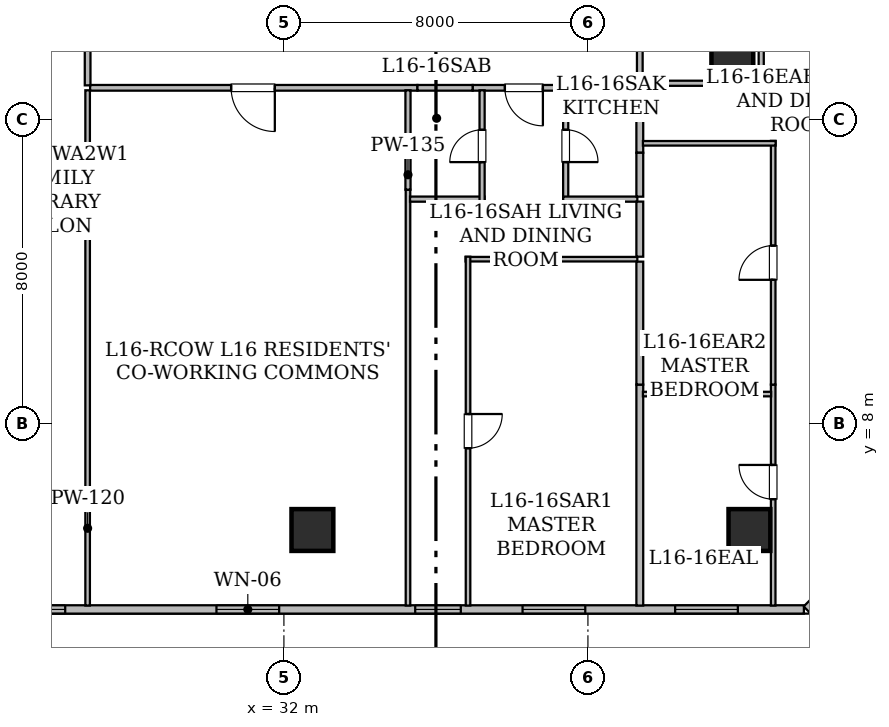
"""IFC4 building model, lengths in metres.
Left out: names, types, materials, properties, quantities, classifications, styles, units other than length and angle.
Written with IfcOpenShell. Run it as: python <this file> out.ifc"""

import sys

from ifc_helpers import new_model, si_unit, direction, frame, frame_2d, origin, origin_2d, place, context, subcontext, project, spatial, rectangle, hollow_rectangle, extrude, element, fill, save


model = new_model("IFC4")
c1 = context("Model", 3, precision=1e-05, world=origin(), true_north=direction((0.0, 1.0)))
c2 = subcontext(c1, "Body", "Model", "MODEL_VIEW")
j1 = project(units=[si_unit("LENGTHUNIT", "METRE"), si_unit("PLANEANGLEUNIT", "RADIAN")], contexts=[c1])
p1 = place(None, origin())
s1 = spatial("IfcSite", under=j1, at=p1, CompositionType="ELEMENT")
p2 = place(p1, origin())
s2 = spatial("IfcBuilding", under=s1, at=p2, CompositionType="ELEMENT")
p3 = place(p2, frame((0.0, 0.0, 66.15)))
s3 = spatial("IfcBuildingStorey", under=s2, at=p3, CompositionType="ELEMENT", Elevation=66.15)
for number, where, z_axis, x_axis in (
    (1, (32.75, 5.2, 0.0), (0.0, 0.0, 1.0), (1.0, 0.0, 0.0)),
    (2, (44.25, 5.2, 0.0), (0.0, 0.0, 1.0), (1.0, 0.0, 0.0)),
    (3, (43.8, 17.8, 0.0), (0.0, 0.0, 1.0), (1.0, 0.0, 0.0)),
):
    element("IfcColumn", number, at=place(p3, frame(where, z_axis=z_axis, x_axis=x_axis)), inside=s3, PredefinedType="COLUMN", context=c2, shape_type="SweptSolid", body=[
        extrude(hollow_rectangle(XDim=1.1, YDim=1.1, WallThickness=0.055, at=origin_2d()), origin(), (0.0, 0.0, 1.0), 3.65),
    ])
p4 = place(p3, frame((49.84, 7.196, 0.0), z_axis=(0.0, 0.0, 1.0), x_axis=(-0.707127905562, -0.70708565618, 0.0)))
e4 = element("IfcWall", 4, at=p4, inside=s3, PredefinedType="STANDARD", context=c2, shape_type="SweptSolid", body=[
    extrude(rectangle(XDim=5.779, YDim=0.22, at=frame_2d((2.889, 0.0))), origin(), (0.0, 0.0, 1.0), 3.43),
])
p5 = place(p3, frame((45.683, 3.11, 0.0), z_axis=(0.0, 0.0, 1.0), x_axis=(-1.0, 0.0, 0.0)))
e5 = element("IfcWall", 5, at=p5, inside=s3, PredefinedType="STANDARD", context=c2, shape_type="SweptSolid", body=[
    extrude(rectangle(XDim=37.368, YDim=0.22, at=frame_2d((18.684, 0.0))), origin(), (0.0, 0.0, 1.0), 3.43),
])
p6 = place(p5, frame((13.808, 0.0, 0.85)))
e6 = element("IfcOpeningElement", 6, at=p6, cuts=e5, PredefinedType="OPENING", context=c2, shape_type="SweptSolid", body=[
    extrude(rectangle(XDim=1.65, YDim=1.55, at=frame_2d((0.825, 0.775))), frame((0.0, 0.12, 0.0), z_axis=(0.0, -1.0, 0.0), x_axis=(1.0, 0.0, 0.0)), (0.0, 0.0, 1.0), 0.24),
])
p7 = place(p5, frame((32.554, 0.0, 0.85)))
e7 = element("IfcOpeningElement", 7, at=p7, cuts=e5, PredefinedType="OPENING", context=c2, shape_type="SweptSolid", body=[
    extrude(rectangle(XDim=1.65, YDim=1.55, at=frame_2d((0.825, 0.775))), frame((0.0, 0.12, 0.0), z_axis=(0.0, -1.0, 0.0), x_axis=(1.0, 0.0, 0.0)), (0.0, 0.0, 1.0), 0.24),
])
p8 = place(p5, frame((19.438, 0.0, 0.85)))
e8 = element("IfcOpeningElement", 8, at=p8, cuts=e5, PredefinedType="OPENING", context=c2, shape_type="SweptSolid", body=[
    extrude(rectangle(XDim=1.65, YDim=1.55, at=frame_2d((0.825, 0.775))), frame((0.0, 0.12, 0.0), z_axis=(0.0, -1.0, 0.0), x_axis=(1.0, 0.0, 0.0)), (0.0, 0.0, 1.0), 0.24),
])
p9 = place(p5, frame((21.869, 0.0, 0.8)))
e9 = element("IfcOpeningElement", 9, at=p9, cuts=e5, PredefinedType="OPENING", context=c2, shape_type="SweptSolid", body=[
    extrude(rectangle(XDim=1.2, YDim=1.5, at=frame_2d((0.6, 0.75))), frame((0.0, 0.12, 0.0), z_axis=(0.0, -1.0, 0.0), x_axis=(1.0, 0.0, 0.0)), (0.0, 0.0, 1.0), 0.24),
])
p10 = place(p5, frame((28.512, 0.0, 0.85)))
e10 = element("IfcOpeningElement", 10, at=p10, cuts=e5, PredefinedType="OPENING", context=c2, shape_type="SweptSolid", body=[
    extrude(rectangle(XDim=1.65, YDim=1.55, at=frame_2d((0.825, 0.775))), frame((0.0, 0.12, 0.0), z_axis=(0.0, -1.0, 0.0), x_axis=(1.0, 0.0, 0.0)), (0.0, 0.0, 1.0), 0.24),
])
p11 = place(p5, frame((24.567, 0.0, 0.85)))
e11 = element("IfcOpeningElement", 11, at=p11, cuts=e5, PredefinedType="OPENING", context=c2, shape_type="SweptSolid", body=[
    extrude(rectangle(XDim=1.65, YDim=1.55, at=frame_2d((0.825, 0.775))), frame((0.0, 0.12, 0.0), z_axis=(0.0, -1.0, 0.0), x_axis=(1.0, 0.0, 0.0)), (0.0, 0.0, 1.0), 0.24),
])
p12 = place(p5, frame((9.028, 0.0, 0.8)))
e12 = element("IfcOpeningElement", 12, at=p12, cuts=e5, PredefinedType="OPENING", context=c2, shape_type="SweptSolid", body=[
    extrude(rectangle(XDim=1.2, YDim=1.5, at=frame_2d((0.6, 0.75))), frame((0.0, 0.12, 0.0), z_axis=(0.0, -1.0, 0.0), x_axis=(1.0, 0.0, 0.0)), (0.0, 0.0, 1.0), 0.24),
])
p13 = place(p5, frame((5.753, 0.0, 0.85)))
e13 = element("IfcOpeningElement", 13, at=p13, cuts=e5, PredefinedType="OPENING", context=c2, shape_type="SweptSolid", body=[
    extrude(rectangle(XDim=1.65, YDim=1.55, at=frame_2d((0.825, 0.775))), frame((0.0, 0.12, 0.0), z_axis=(0.0, -1.0, 0.0), x_axis=(1.0, 0.0, 0.0)), (0.0, 0.0, 1.0), 0.24),
])
p14 = place(p5, frame((1.738, 0.0, 0.85)))
e14 = element("IfcOpeningElement", 14, at=p14, cuts=e5, PredefinedType="OPENING", context=c2, shape_type="SweptSolid", body=[
    extrude(rectangle(XDim=1.65, YDim=1.55, at=frame_2d((0.825, 0.775))), frame((0.0, 0.12, 0.0), z_axis=(0.0, -1.0, 0.0), x_axis=(1.0, 0.0, 0.0)), (0.0, 0.0, 1.0), 0.24),
])
p15 = place(p3, frame((35.514, 16.835, 0.0), z_axis=(0.0, 0.0, 1.0), x_axis=(-1.0, 0.0, 0.0)))
e15 = element("IfcWall", 15, at=p15, inside=s3, PredefinedType="STANDARD", context=c2, shape_type="SweptSolid", body=[
    extrude(rectangle(XDim=8.614, YDim=0.15, at=frame_2d((4.307, 0.0))), origin(), (0.0, 0.0, 1.0), 2.647),
])
p16 = place(p15, frame((3.753, 0.0, 0.0)))
e16 = element("IfcOpeningElement", 16, at=p16, cuts=e15, PredefinedType="OPENING", context=c2, shape_type="SweptSolid", body=[
    extrude(rectangle(XDim=1.15, YDim=2.2, at=frame_2d((0.575, 1.1))), frame((0.0, 0.085, 0.0), z_axis=(0.0, -1.0, 0.0), x_axis=(1.0, 0.0, 0.0)), (0.0, 0.0, 1.0), 0.17),
])
p17 = place(p3, frame((26.835, 16.9, 0.0), z_axis=(0.0, 0.0, 1.0), x_axis=(0.0, 1.0, 0.0)))
e17 = element("IfcWall", 17, at=p17, inside=s3, PredefinedType="STANDARD", context=c2, shape_type="SweptSolid", body=[
    extrude(rectangle(XDim=2.068, YDim=0.15, at=frame_2d((1.034, 0.0))), origin(), (0.0, 0.0, 1.0), 2.647),
])
p18 = place(p3, frame((39.664, 16.835, 0.0), z_axis=(0.0, 0.0, 1.0), x_axis=(-1.0, 0.0, 0.0)))
e18 = element("IfcWall", 18, at=p18, inside=s3, PredefinedType="STANDARD", context=c2, shape_type="SweptSolid", body=[
    extrude(rectangle(XDim=2.698, YDim=0.15, at=frame_2d((1.349, 0.0))), origin(), (0.0, 0.0, 1.0), 3.43),
])
p19 = place(p18, frame((0.849, 0.0, 0.0)))
e19 = element("IfcOpeningElement", 19, at=p19, cuts=e18, PredefinedType="OPENING", context=c2, shape_type="SweptSolid", body=[
    extrude(rectangle(XDim=1.0, YDim=2.15, at=frame_2d((0.5, 1.075))), frame((0.0, 0.085, 0.0), z_axis=(0.0, -1.0, 0.0), x_axis=(1.0, 0.0, 0.0)), (0.0, 0.0, 1.0), 0.17),
])
p20 = place(p3, frame((36.966, 16.835, 0.0), z_axis=(0.0, 0.0, 1.0), x_axis=(-1.0, 0.0, 0.0)))
e20 = element("IfcWall", 20, at=p20, inside=s3, PredefinedType="STANDARD", context=c2, shape_type="SweptSolid", body=[
    extrude(rectangle(XDim=1.452, YDim=0.15, at=frame_2d((0.726, 0.0))), origin(), (0.0, 0.0, 1.0), 3.43),
])
p21 = place(p3, frame((41.3, 16.835, 0.0), z_axis=(0.0, 0.0, 1.0), x_axis=(-1.0, 0.0, 0.0)))
e21 = element("IfcWall", 21, at=p21, inside=s3, PredefinedType="STANDARD", context=c2, shape_type="SweptSolid", body=[
    extrude(rectangle(XDim=1.636, YDim=0.15, at=frame_2d((0.818, 0.0))), origin(), (0.0, 0.0, 1.0), 3.43),
])
p22 = place(p3, frame((41.365, 17.204, 0.0), z_axis=(0.0, 0.0, 1.0), x_axis=(0.0, -1.0, 0.0)))
e22 = element("IfcWall", 22, at=p22, inside=s3, PredefinedType="STANDARD", context=c2, shape_type="SweptSolid", body=[
    extrude(rectangle(XDim=0.304, YDim=0.15, at=frame_2d((0.152, 0.0))), origin(), (0.0, 0.0, 1.0), 3.43),
])
p23 = place(p3, frame((41.365, 20.6, 0.0), z_axis=(0.0, 0.0, 1.0), x_axis=(0.0, -1.0, 0.0)))
e23 = element("IfcWall", 23, at=p23, inside=s3, PredefinedType="STANDARD", context=c2, shape_type="SweptSolid", body=[
    extrude(rectangle(XDim=3.396, YDim=0.15, at=frame_2d((1.698, 0.0))), origin(), (0.0, 0.0, 1.0), 2.647),
])
p24 = place(p3, frame((26.835, 3.212, 0.0), z_axis=(0.0, 0.0, 1.0), x_axis=(0.0, 1.0, 0.0)))
e24 = element("IfcWall", 24, at=p24, inside=s3, PredefinedType="PARTITIONING", context=c2, shape_type="SweptSolid", body=[
    extrude(rectangle(XDim=13.558, YDim=0.12, at=frame_2d((6.779, 0.0))), origin(), (0.0, 0.0, 1.0), 2.803),
])
p25 = place(p3, frame((35.265, 14.155, 0.0), z_axis=(0.0, 0.0, 1.0), x_axis=(0.0, -1.0, 0.0)))
e25 = element("IfcWall", 25, at=p25, inside=s3, PredefinedType="PARTITIONING", context=c2, shape_type="SweptSolid", body=[
    extrude(rectangle(XDim=10.943, YDim=0.12, at=frame_2d((5.472, 0.0))), origin(), (0.0, 0.0, 1.0), 2.803),
])
p26 = place(p3, frame((35.265, 16.77, 0.0), z_axis=(0.0, 0.0, 1.0), x_axis=(0.0, -1.0, 0.0)))
e26 = element("IfcWall", 26, at=p26, inside=s3, PredefinedType="PARTITIONING", context=c2, shape_type="SweptSolid", body=[
    extrude(rectangle(XDim=2.615, YDim=0.135, at=frame_2d((1.308, 0.0))), origin(), (0.0, 0.0, 1.0), 3.43),
])
p27 = place(p3, frame((35.319, 13.906, 0.0), z_axis=(0.0, 0.0, 1.0), x_axis=(1.0, 0.0, 0.0)))
e27 = element("IfcWall", 27, at=p27, inside=s3, PredefinedType="PARTITIONING", context=c2, shape_type="SweptSolid", body=[
    extrude(rectangle(XDim=1.961, YDim=0.135, at=frame_2d((0.98, 0.0))), origin(), (0.0, 0.0, 1.0), 3.43),
])
p28 = place(p3, frame((37.215, 13.841, 0.0), z_axis=(0.0, 0.0, 1.0), x_axis=(0.0, 1.0, 0.0)))
e28 = element("IfcWall", 28, at=p28, inside=s3, PredefinedType="PARTITIONING", context=c2, shape_type="SweptSolid", body=[
    extrude(rectangle(XDim=2.929, YDim=0.135, at=frame_2d((1.464, 0.0))), origin(), (0.0, 0.0, 1.0), 3.43),
])
p29 = place(p28, frame((1.039, 0.0, 0.0)))
e29 = element("IfcOpeningElement", 29, at=p29, cuts=e28, PredefinedType="OPENING", context=c2, shape_type="SweptSolid", body=[
    extrude(rectangle(XDim=0.85, YDim=2.1, at=frame_2d((0.425, 1.05))), frame((0.0, 0.077, 0.0), z_axis=(0.0, -1.0, 0.0), x_axis=(1.0, 0.0, 0.0)), (0.0, 0.0, 1.0), 0.155),
])
p30 = place(p3, frame((39.415, 16.77, 0.0), z_axis=(0.0, 0.0, 1.0), x_axis=(0.0, -1.0, 0.0)))
e30 = element("IfcWall", 30, at=p30, inside=s3, PredefinedType="PARTITIONING", context=c2, shape_type="SweptSolid", body=[
    extrude(rectangle(XDim=2.929, YDim=0.135, at=frame_2d((1.464, 0.0))), origin(), (0.0, 0.0, 1.0), 3.43),
])
p31 = place(p30, frame((1.039, 0.0, 0.0)))
e31 = element("IfcOpeningElement", 31, at=p31, cuts=e30, PredefinedType="OPENING", context=c2, shape_type="SweptSolid", body=[
    extrude(rectangle(XDim=0.85, YDim=2.1, at=frame_2d((0.425, 1.05))), frame((0.0, 0.077, 0.0), z_axis=(0.0, -1.0, 0.0), x_axis=(1.0, 0.0, 0.0)), (0.0, 0.0, 1.0), 0.155),
])
p32 = place(p3, frame((39.35, 13.906, 0.0), z_axis=(0.0, 0.0, 1.0), x_axis=(1.0, 0.0, 0.0)))
e32 = element("IfcWall", 32, at=p32, inside=s3, PredefinedType="PARTITIONING", context=c2, shape_type="SweptSolid", body=[
    extrude(rectangle(XDim=1.95, YDim=0.135, at=frame_2d((0.975, 0.0))), origin(), (0.0, 0.0, 1.0), 3.43),
])
p33 = place(p3, frame((41.3, 12.326, 0.0), z_axis=(0.0, 0.0, 1.0), x_axis=(-1.0, 0.0, 0.0)))
e33 = element("IfcWall", 33, at=p33, inside=s3, PredefinedType="PARTITIONING", context=c2, shape_type="SweptSolid", body=[
    extrude(rectangle(XDim=4.52, YDim=0.12, at=frame_2d((2.26, 0.0))), origin(), (0.0, 0.0, 1.0), 3.43),
])
p34 = place(p3, frame((36.845, 12.391, 0.0), z_axis=(0.0, 0.0, 1.0), x_axis=(0.0, -1.0, 0.0)))
e34 = element("IfcWall", 34, at=p34, inside=s3, PredefinedType="PARTITIONING", context=c2, shape_type="SweptSolid", body=[
    extrude(rectangle(XDim=9.179, YDim=0.12, at=frame_2d((4.59, 0.0))), origin(), (0.0, 0.0, 1.0), 2.803),
])
p35 = place(p34, frame((4.139, 0.0, 0.0)))
e35 = element("IfcOpeningElement", 35, at=p35, cuts=e34, PredefinedType="OPENING", context=c2, shape_type="SweptSolid", body=[
    extrude(rectangle(XDim=0.9, YDim=2.1, at=frame_2d((0.45, 1.05))), frame((0.0, 0.07, 0.0), z_axis=(0.0, -1.0, 0.0), x_axis=(1.0, 0.0, 0.0)), (0.0, 0.0, 1.0), 0.14),
])
p36 = place(p3, frame((41.365, 13.841, 0.0), z_axis=(0.0, 0.0, 1.0), x_axis=(0.0, -1.0, 0.0)))
e36 = element("IfcWall", 36, at=p36, inside=s3, PredefinedType="STANDARD", context=c2, shape_type="SweptSolid", body=[
    extrude(rectangle(XDim=1.45, YDim=0.18, at=frame_2d((0.725, 0.0))), origin(), (0.0, 0.0, 1.0), 3.43),
])
p37 = place(p3, frame((41.365, 16.77, 0.0), z_axis=(0.0, 0.0, 1.0), x_axis=(0.0, -1.0, 0.0)))
e37 = element("IfcWall", 37, at=p37, inside=s3, PredefinedType="STANDARD", context=c2, shape_type="SweptSolid", body=[
    extrude(rectangle(XDim=1.644, YDim=0.18, at=frame_2d((0.822, 0.0))), origin(), (0.0, 0.0, 1.0), 3.43),
])
p38 = place(p3, frame((41.365, 15.126, 0.0), z_axis=(0.0, 0.0, 1.0), x_axis=(0.0, -1.0, 0.0)))
e38 = element("IfcWall", 38, at=p38, inside=s3, PredefinedType="STANDARD", context=c2, shape_type="SweptSolid", body=[
    extrude(rectangle(XDim=1.155, YDim=0.18, at=frame_2d((0.578, 0.0))), origin(), (0.0, 0.0, 1.0), 3.43),
])
p39 = place(p3, frame((41.365, 9.026, 0.0), z_axis=(0.0, 0.0, 1.0), x_axis=(0.0, -1.0, 0.0)))
e39 = element("IfcWall", 39, at=p39, inside=s3, PredefinedType="STANDARD", context=c2, shape_type="SweptSolid", body=[
    extrude(rectangle(XDim=5.814, YDim=0.18, at=frame_2d((2.907, 0.0))), origin(), (0.0, 0.0, 1.0), 2.803),
])
p40 = place(p3, frame((41.365, 12.261, 0.0), z_axis=(0.0, 0.0, 1.0), x_axis=(0.0, -1.0, 0.0)))
e40 = element("IfcWall", 40, at=p40, inside=s3, PredefinedType="STANDARD", context=c2, shape_type="SweptSolid", body=[
    extrude(rectangle(XDim=3.235, YDim=0.18, at=frame_2d((1.618, 0.0))), origin(), (0.0, 0.0, 1.0), 3.43),
])
p41 = place(p3, frame((41.432, 16.955, 0.0), z_axis=(0.0, 0.0, 1.0), x_axis=(1.0, 0.0, 0.0)))
e41 = element("IfcWall", 41, at=p41, inside=s3, PredefinedType="PARTITIONING", context=c2, shape_type="SweptSolid", body=[
    extrude(rectangle(XDim=3.193, YDim=0.135, at=frame_2d((1.597, 0.0))), origin(), (0.0, 0.0, 1.0), 2.647),
])
p42 = place(p3, frame((44.56, 16.89, 0.0), z_axis=(0.0, 0.0, 1.0), x_axis=(0.0, 1.0, 0.0)))
e42 = element("IfcWall", 42, at=p42, inside=s3, PredefinedType="PARTITIONING", context=c2, shape_type="SweptSolid", body=[
    extrude(rectangle(XDim=3.58, YDim=0.135, at=frame_2d((1.79, 0.0))), origin(), (0.0, 0.0, 1.0), 2.647),
])
p43 = place(p42, frame((1.565, 0.0, 0.0)))
e43 = element("IfcOpeningElement", 43, at=p43, cuts=e42, PredefinedType="OPENING", context=c2, shape_type="SweptSolid", body=[
    extrude(rectangle(XDim=0.85, YDim=2.1, at=frame_2d((0.425, 1.05))), frame((0.0, 0.077, 0.0), z_axis=(0.0, -1.0, 0.0), x_axis=(1.0, 0.0, 0.0)), (0.0, 0.0, 1.0), 0.155),
])
p44 = place(p3, frame((44.875, 3.212, 0.0), z_axis=(0.0, 0.0, 1.0), x_axis=(0.0, 1.0, 0.0)))
e44 = element("IfcWall", 44, at=p44, inside=s3, PredefinedType="PARTITIONING", context=c2, shape_type="SweptSolid", body=[
    extrude(rectangle(XDim=5.814, YDim=0.12, at=frame_2d((2.907, 0.0))), origin(), (0.0, 0.0, 1.0), 2.803),
])
p45 = place(p44, frame((2.8, 0.0, 0.0)))
e45 = element("IfcOpeningElement", 45, at=p45, cuts=e44, PredefinedType="OPENING", context=c2, shape_type="SweptSolid", body=[
    extrude(rectangle(XDim=0.9, YDim=2.1, at=frame_2d((0.45, 1.05))), frame((0.0, 0.07, 0.0), z_axis=(0.0, -1.0, 0.0), x_axis=(1.0, 0.0, 0.0)), (0.0, 0.0, 1.0), 0.14),
])
p46 = place(p3, frame((44.875, 9.026, 0.0), z_axis=(0.0, 0.0, 1.0), x_axis=(0.0, 1.0, 0.0)))
e46 = element("IfcWall", 46, at=p46, inside=s3, PredefinedType="PARTITIONING", context=c2, shape_type="SweptSolid", body=[
    extrude(rectangle(XDim=6.414, YDim=0.12, at=frame_2d((3.207, 0.0))), origin(), (0.0, 0.0, 1.0), 3.43),
])
p47 = place(p46, frame((2.757, 0.0, 0.0)))
e47 = element("IfcOpeningElement", 47, at=p47, cuts=e46, PredefinedType="OPENING", context=c2, shape_type="SweptSolid", body=[
    extrude(rectangle(XDim=0.9, YDim=2.1, at=frame_2d((0.45, 1.05))), frame((0.0, 0.07, 0.0), z_axis=(0.0, -1.0, 0.0), x_axis=(1.0, 0.0, 0.0)), (0.0, 0.0, 1.0), 0.14),
])
p48 = place(p3, frame((44.94, 15.375, 0.0), z_axis=(0.0, 0.0, 1.0), x_axis=(-1.0, 0.0, 0.0)))
e48 = element("IfcWall", 48, at=p48, inside=s3, PredefinedType="PARTITIONING", context=c2, shape_type="SweptSolid", body=[
    extrude(rectangle(XDim=3.493, YDim=0.12, at=frame_2d((1.747, 0.0))), origin(), (0.0, 0.0, 1.0), 2.647),
])
p49 = place(p3, frame((41.447, 8.777, 0.0), z_axis=(0.0, 0.0, 1.0), x_axis=(1.0, 0.0, 0.0)))
e49 = element("IfcWall", 49, at=p49, inside=s3, PredefinedType="PARTITIONING", context=c2, shape_type="SweptSolid", body=[
    extrude(rectangle(XDim=3.374, YDim=0.12, at=frame_2d((1.687, 0.0))), origin(), (0.0, 0.0, 1.0), 2.647),
])
p50 = place(p6, origin())
e50 = element("IfcWindow", 50, at=p50, inside=s3, PartitioningType="SINGLE_PANEL", PredefinedType="WINDOW", context=c2, shape_type="SweptSolid", body=[
    extrude(rectangle(XDim=1.65, YDim=1.55, at=frame_2d((0.825, 0.775))), frame((0.0, 0.03, 0.0), z_axis=(0.0, -1.0, 0.0), x_axis=(1.0, 0.0, 0.0)), (0.0, 0.0, 1.0), 0.06),
])
fill(e6, e50)
p51 = place(p8, origin())
e51 = element("IfcWindow", 51, at=p51, inside=s3, PartitioningType="SINGLE_PANEL", PredefinedType="WINDOW", context=c2, shape_type="SweptSolid", body=[
    extrude(rectangle(XDim=1.65, YDim=1.55, at=frame_2d((0.825, 0.775))), frame((0.0, 0.03, 0.0), z_axis=(0.0, -1.0, 0.0), x_axis=(1.0, 0.0, 0.0)), (0.0, 0.0, 1.0), 0.06),
])
fill(e8, e51)
p52 = place(p12, origin())
e52 = element("IfcWindow", 52, at=p52, inside=s3, PartitioningType="SINGLE_PANEL", PredefinedType="WINDOW", context=c2, shape_type="SweptSolid", body=[
    extrude(rectangle(XDim=1.2, YDim=1.5, at=frame_2d((0.6, 0.75))), frame((0.0, 0.03, 0.0), z_axis=(0.0, -1.0, 0.0), x_axis=(1.0, 0.0, 0.0)), (0.0, 0.0, 1.0), 0.06),
])
fill(e12, e52)
p53 = place(p13, origin())
e53 = element("IfcWindow", 53, at=p53, inside=s3, PartitioningType="SINGLE_PANEL", PredefinedType="WINDOW", context=c2, shape_type="SweptSolid", body=[
    extrude(rectangle(XDim=1.65, YDim=1.55, at=frame_2d((0.825, 0.775))), frame((0.0, 0.03, 0.0), z_axis=(0.0, -1.0, 0.0), x_axis=(1.0, 0.0, 0.0)), (0.0, 0.0, 1.0), 0.06),
])
fill(e13, e53)
p54 = place(p14, origin())
e54 = element("IfcWindow", 54, at=p54, inside=s3, PartitioningType="SINGLE_PANEL", PredefinedType="WINDOW", context=c2, shape_type="SweptSolid", body=[
    extrude(rectangle(XDim=1.65, YDim=1.55, at=frame_2d((0.825, 0.775))), frame((0.0, 0.03, 0.0), z_axis=(0.0, -1.0, 0.0), x_axis=(1.0, 0.0, 0.0)), (0.0, 0.0, 1.0), 0.06),
])
fill(e14, e54)
p55 = place(p16, origin())
e55 = element("IfcDoor", 55, at=p55, inside=s3, OperationType="SINGLE_SWING_LEFT", PredefinedType="DOOR", context=c2, shape_type="SweptSolid", body=[
    extrude(rectangle(XDim=1.15, YDim=2.2, at=frame_2d((0.575, 1.1))), frame((0.0, 0.025, 0.0), z_axis=(0.0, -1.0, 0.0), x_axis=(1.0, 0.0, 0.0)), (0.0, 0.0, 1.0), 0.05),
])
fill(e16, e55)
p56 = place(p19, origin())
e56 = element("IfcDoor", 56, at=p56, inside=s3, OperationType="SINGLE_SWING_LEFT", PredefinedType="DOOR", context=c2, shape_type="SweptSolid", body=[
    extrude(rectangle(XDim=1.0, YDim=2.15, at=frame_2d((0.5, 1.075))), frame((0.0, 0.025, 0.0), z_axis=(0.0, -1.0, 0.0), x_axis=(1.0, 0.0, 0.0)), (0.0, 0.0, 1.0), 0.05),
])
fill(e19, e56)
p57 = place(p29, origin())
e57 = element("IfcDoor", 57, at=p57, inside=s3, OperationType="SINGLE_SWING_LEFT", PredefinedType="DOOR", context=c2, shape_type="SweptSolid", body=[
    extrude(rectangle(XDim=0.85, YDim=2.1, at=frame_2d((0.425, 1.05))), frame((0.0, 0.025, 0.0), z_axis=(0.0, -1.0, 0.0), x_axis=(1.0, 0.0, 0.0)), (0.0, 0.0, 1.0), 0.05),
])
fill(e29, e57)
p58 = place(p31, origin())
e58 = element("IfcDoor", 58, at=p58, inside=s3, OperationType="SINGLE_SWING_RIGHT", PredefinedType="DOOR", context=c2, shape_type="SweptSolid", body=[
    extrude(rectangle(XDim=0.85, YDim=2.1, at=frame_2d((0.425, 1.05))), frame((0.0, 0.025, 0.0), z_axis=(0.0, -1.0, 0.0), x_axis=(1.0, 0.0, 0.0)), (0.0, 0.0, 1.0), 0.05),
])
fill(e31, e58)
p59 = place(p35, origin())
e59 = element("IfcDoor", 59, at=p59, inside=s3, OperationType="SINGLE_SWING_LEFT", PredefinedType="DOOR", context=c2, shape_type="SweptSolid", body=[
    extrude(rectangle(XDim=0.9, YDim=2.1, at=frame_2d((0.45, 1.05))), frame((0.0, 0.025, 0.0), z_axis=(0.0, -1.0, 0.0), x_axis=(1.0, 0.0, 0.0)), (0.0, 0.0, 1.0), 0.05),
])
fill(e35, e59)
p60 = place(p45, origin())
e60 = element("IfcDoor", 60, at=p60, inside=s3, OperationType="SINGLE_SWING_RIGHT", PredefinedType="DOOR", context=c2, shape_type="SweptSolid", body=[
    extrude(rectangle(XDim=0.9, YDim=2.1, at=frame_2d((0.45, 1.05))), frame((0.0, 0.025, 0.0), z_axis=(0.0, -1.0, 0.0), x_axis=(1.0, 0.0, 0.0)), (0.0, 0.0, 1.0), 0.05),
])
fill(e45, e60)
p61 = place(p47, origin())
e61 = element("IfcDoor", 61, at=p61, inside=s3, OperationType="SINGLE_SWING_LEFT", PredefinedType="DOOR", context=c2, shape_type="SweptSolid", body=[
    extrude(rectangle(XDim=0.9, YDim=2.1, at=frame_2d((0.45, 1.05))), frame((0.0, 0.025, 0.0), z_axis=(0.0, -1.0, 0.0), x_axis=(1.0, 0.0, 0.0)), (0.0, 0.0, 1.0), 0.05),
])
fill(e47, e61)
save(model, sys.argv[1])
